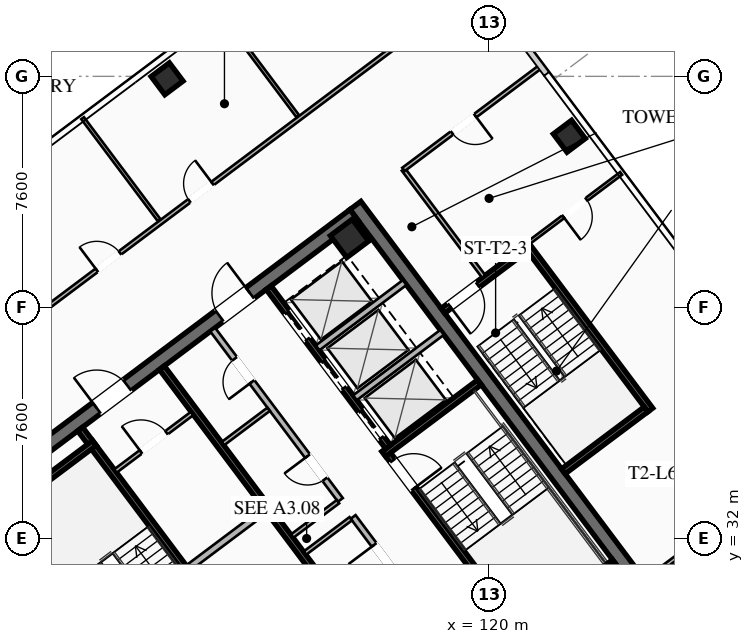
"""IFC4 building model, lengths in metres.
Left out: names, types, materials, properties, quantities, classifications, styles, units other than length and angle.
Written with IfcOpenShell. Run it as: python <this file> out.ifc"""

import sys

from ifc_helpers import new_model, si_unit, direction, frame, frame_2d, origin, origin_2d, place, context, subcontext, project, spatial, rectangle, hollow_rectangle, extrude, element, fill, save


model = new_model("IFC4")
c1 = context("Model", 3, precision=1e-05, world=origin(), true_north=direction((0.0, 1.0)))
c2 = subcontext(c1, "Body", "Model", "MODEL_VIEW")
j1 = project(units=[si_unit("LENGTHUNIT", "METRE"), si_unit("PLANEANGLEUNIT", "RADIAN")], contexts=[c1])
p1 = place(None, origin())
s1 = spatial("IfcSite", under=j1, at=p1, CompositionType="ELEMENT")
p2 = place(p1, origin())
s2 = spatial("IfcBuilding", under=s1, at=p2, CompositionType="ELEMENT")
p3 = place(p2, frame((0.0, 0.0, 221.95)))
s3 = spatial("IfcBuildingStorey", under=s2, at=p3, CompositionType="ELEMENT", Elevation=221.95)
for number, where, z_axis, x_axis in (
    (1, (112.396, 21.047, 0.0), (0.0, 0.0, 1.0), (-0.6, 0.8, 0.0)),
    (2, (115.604, 42.953, 0.0), (0.0, 0.0, 1.0), (0.6, -0.8, 0.0)),
):
    element("IfcWall", number, at=place(p3, frame(where, z_axis=z_axis, x_axis=x_axis)), inside=s3, PredefinedType="SHEAR", context=c2, shape_type="SweptSolid", body=[
        extrude(rectangle(XDim=15.6, YDim=0.45, at=frame_2d((7.8, 0.0))), origin(), (0.0, 0.0, 1.0), 3.55),
    ])
p4 = place(p3, frame((103.351, 33.482, 0.0), z_axis=(0.0, 0.0, 1.0), x_axis=(0.8, 0.6, 0.0)))
e3 = element("IfcWall", 3, at=p4, inside=s3, PredefinedType="SHEAR", context=c2, shape_type="SweptSolid", body=[
    extrude(rectangle(XDim=15.26, YDim=0.45, at=frame_2d((7.63, 0.0))), origin(), (0.0, 0.0, 1.0), 3.55),
])
p5 = place(p4, frame((4.68, 0.0, 0.0)))
e4 = element("IfcOpeningElement", 4, at=p5, cuts=e3, PredefinedType="OPENING", context=c2, shape_type="SweptSolid", body=[
    extrude(rectangle(XDim=1.25, YDim=2.25, at=frame_2d((0.625, 1.125))), frame((0.0, 0.235, 0.0), z_axis=(0.0, -1.0, 0.0), x_axis=(1.0, 0.0, 0.0)), (0.0, 0.0, 1.0), 0.47),
])
p6 = place(p4, frame((9.73, 0.0, 0.0)))
e5 = element("IfcOpeningElement", 5, at=p6, cuts=e3, PredefinedType="OPENING", context=c2, shape_type="SweptSolid", body=[
    extrude(rectangle(XDim=1.25, YDim=2.25, at=frame_2d((0.625, 1.125))), frame((0.0, 0.235, 0.0), z_axis=(0.0, -1.0, 0.0), x_axis=(1.0, 0.0, 0.0)), (0.0, 0.0, 1.0), 0.47),
])
for number, where, z_axis, x_axis in (
    (6, (123.87, 30.59, 0.0), (0.0, 0.0, 1.0), (0.8, 0.6, 0.0)),
    (7, (115.41, 41.87, 0.0), (0.0, 0.0, 1.0), (0.8, 0.6, 0.0)),
):
    element("IfcColumn", number, at=place(p3, frame(where, z_axis=z_axis, x_axis=x_axis)), inside=s3, PredefinedType="COLUMN", context=c2, shape_type="SweptSolid", body=[
        extrude(hollow_rectangle(XDim=0.9, YDim=0.9, WallThickness=0.04, at=origin_2d()), origin(), (0.0, 0.0, 1.0), 3.37),
    ])
for number, where, z_axis, x_axis in (
    (8, (122.64, 45.23, 0.0), (0.0, 0.0, 1.0), (0.8, 0.6, 0.0)),
    (9, (109.41, 47.12, 0.0), (0.0, 0.0, 1.0), (0.8, 0.6, 0.0)),
):
    element("IfcColumn", number, at=place(p3, frame(where, z_axis=z_axis, x_axis=x_axis)), inside=s3, PredefinedType="COLUMN", context=c2, shape_type="SweptSolid", body=[
        extrude(hollow_rectangle(XDim=0.75, YDim=0.75, WallThickness=0.032, at=origin_2d()), origin(), (0.0, 0.0, 1.0), 3.37),
    ])
p7 = place(p3, frame((111.44, 29.08, 0.0), z_axis=(0.0, 0.0, 1.0), x_axis=(-0.59999041401, 0.800007189403, 0.0)))
e10 = element("IfcWall", 10, at=p7, inside=s3, PredefinedType="SHEAR", context=c2, shape_type="SweptSolid", body=[
    extrude(rectangle(XDim=8.15, YDim=0.2, at=frame_2d((4.075, 0.0))), origin(), (0.0, 0.0, 1.0), 3.37),
])
p8 = place(p7, frame((0.45, 0.0, 0.0)))
e11 = element("IfcOpeningElement", 11, at=p8, cuts=e10, PredefinedType="OPENING", context=c2, shape_type="SweptSolid", body=[
    extrude(rectangle(XDim=1.15, YDim=2.2, at=frame_2d((0.575, 1.1))), frame((0.0, 0.11, 0.0), z_axis=(0.0, -1.0, 0.0), x_axis=(1.0, 0.0, 0.0)), (0.0, 0.0, 1.0), 0.22),
])
p9 = place(p3, frame((103.876, 32.782, 0.0), z_axis=(0.0, 0.0, 1.0), x_axis=(0.800014909178, 0.599980120581, 0.0)))
e12 = element("IfcWall", 12, at=p9, inside=s3, PredefinedType="SHEAR", context=c2, shape_type="SweptSolid", body=[
    extrude(rectangle(XDim=3.93, YDim=0.2, at=frame_2d((1.965, 0.0))), origin(), (0.0, 0.0, 1.0), 3.37),
])
p10 = place(p3, frame((116.56, 34.92, 0.0), z_axis=(0.0, 0.0, 1.0), x_axis=(0.59999041401, -0.800007189403, 0.0)))
e13 = element("IfcWall", 13, at=p10, inside=s3, PredefinedType="SHEAR", context=c2, shape_type="SweptSolid", body=[
    extrude(rectangle(XDim=8.15, YDim=0.2, at=frame_2d((4.075, 0.0))), origin(), (0.0, 0.0, 1.0), 3.37),
])
p11 = place(p10, frame((0.45, 0.0, 0.0)))
e14 = element("IfcOpeningElement", 14, at=p11, cuts=e13, PredefinedType="OPENING", context=c2, shape_type="SweptSolid", body=[
    extrude(rectangle(XDim=1.15, YDim=2.2, at=frame_2d((0.575, 1.1))), frame((0.0, 0.11, 0.0), z_axis=(0.0, -1.0, 0.0), x_axis=(1.0, 0.0, 0.0)), (0.0, 0.0, 1.0), 0.22),
])
for number, where, z_axis, x_axis in (
    (15, (116.54, 34.78, 0.0), (0.0, 0.0, 1.0), (0.8, 0.6, 0.0)),
    (16, (120.98, 28.86, 0.0), (0.0, 0.0, 1.0), (0.8, 0.6, 0.0)),
):
    element("IfcWall", number, at=place(p3, frame(where, z_axis=z_axis, x_axis=x_axis)), inside=s3, PredefinedType="SHEAR", context=c2, shape_type="SweptSolid", body=[
        extrude(rectangle(XDim=3.93, YDim=0.2, at=frame_2d((1.965, 0.0))), origin(), (0.0, 0.0, 1.0), 3.37),
    ])
p12 = place(p3, frame((118.058, 25.856, 0.0), z_axis=(0.0, 0.0, 1.0), x_axis=(-0.600002657301, 0.799998007018, 0.0)))
e17 = element("IfcWall", 17, at=p12, inside=s3, PredefinedType="SHEAR", context=c2, shape_type="SweptSolid", body=[
    extrude(rectangle(XDim=14.7, YDim=0.2, at=frame_2d((7.35, 0.0))), origin(), (0.0, 0.0, 1.0), 3.37),
])
p13 = place(p3, frame((110.104, 31.028, 0.0), z_axis=(0.0, 0.0, 1.0), x_axis=(0.800018601094, 0.59997519774, 0.0)))
e18 = element("IfcWall", 18, at=p13, inside=s3, PredefinedType="SOLIDWALL", context=c2, shape_type="SweptSolid", body=[
    extrude(rectangle(XDim=3.15, YDim=0.22, at=frame_2d((1.575, 0.0))), origin(), (0.0, 0.0, 1.0), 2.723),
])
p14 = place(p3, frame((112.75, 40.25, 0.0), z_axis=(0.0, 0.0, 1.0), x_axis=(0.599994036198, -0.800004472816, 0.0)))
e19 = element("IfcWall", 19, at=p14, inside=s3, PredefinedType="SHEAR", context=c2, shape_type="SweptSolid", body=[
    extrude(rectangle(XDim=6.55, YDim=0.2, at=frame_2d((3.275, 0.0))), origin(), (0.0, 0.0, 1.0), 3.37),
])
p15 = place(p14, frame((5.075, 0.0, 0.0)))
e20 = element("IfcOpeningElement", 20, at=p15, cuts=e19, PredefinedType="OPENING", context=c2, shape_type="SweptSolid", body=[
    extrude(rectangle(XDim=1.1, YDim=2.2, at=frame_2d((0.55, 1.1))), frame((0.0, 0.11, 0.0), z_axis=(0.0, -1.0, 0.0), x_axis=(1.0, 0.0, 0.0)), (0.0, 0.0, 1.0), 0.22),
])
p16 = place(p14, frame((3.025, 0.0, 0.0)))
e21 = element("IfcOpeningElement", 21, at=p16, cuts=e19, PredefinedType="OPENING", context=c2, shape_type="SweptSolid", body=[
    extrude(rectangle(XDim=1.1, YDim=2.2, at=frame_2d((0.55, 1.1))), frame((0.0, 0.11, 0.0), z_axis=(0.0, -1.0, 0.0), x_axis=(1.0, 0.0, 0.0)), (0.0, 0.0, 1.0), 0.22),
])
p17 = place(p14, frame((1.025, 0.0, 0.0)))
e22 = element("IfcOpeningElement", 22, at=p17, cuts=e19, PredefinedType="OPENING", context=c2, shape_type="SweptSolid", body=[
    extrude(rectangle(XDim=1.1, YDim=2.2, at=frame_2d((0.55, 1.1))), frame((0.0, 0.11, 0.0), z_axis=(0.0, -1.0, 0.0), x_axis=(1.0, 0.0, 0.0)), (0.0, 0.0, 1.0), 0.22),
])
for number, where, z_axis, x_axis in (
    (23, (115.59, 36.63, 0.0), (0.0, 0.0, 1.0), (0.8, 0.6, 0.0)),
    (24, (114.36, 38.27, 0.0), (0.0, 0.0, 1.0), (0.8, 0.6, 0.0)),
):
    element("IfcWall", number, at=place(p3, frame(where, z_axis=z_axis, x_axis=x_axis)), inside=s3, PredefinedType="SOLIDWALL", context=c2, shape_type="SweptSolid", body=[
        extrude(rectangle(XDim=3.58, YDim=0.2, at=frame_2d((1.79, 0.0))), origin(), (0.0, 0.0, 1.0), 3.37),
    ])
p18 = place(p3, frame((107.71, 34.22, 0.0), z_axis=(0.0, 0.0, 1.0), x_axis=(0.799981399002, 0.60002480053, 0.0)))
e25 = element("IfcWall", 25, at=p18, inside=s3, PredefinedType="PARTITIONING", context=c2, shape_type="SweptSolid", body=[
    extrude(rectangle(XDim=3.15, YDim=0.135, at=frame_2d((1.575, 0.0))), origin(), (0.0, 0.0, 1.0), 2.723),
])
p19 = place(p18, frame((1.05, 0.0, 0.0)))
e26 = element("IfcOpeningElement", 26, at=p19, cuts=e25, PredefinedType="OPENING", context=c2, shape_type="SweptSolid", body=[
    extrude(rectangle(XDim=1.05, YDim=2.2, at=frame_2d((0.525, 1.1))), frame((0.0, 0.077, 0.0), z_axis=(0.0, -1.0, 0.0), x_axis=(1.0, 0.0, 0.0)), (0.0, 0.0, 1.0), 0.155),
])
p20 = place(p3, frame((119.73, 27.11, 0.0), z_axis=(0.0, 0.0, 1.0), x_axis=(-0.600005580459, 0.799995814625, 0.0)))
e27 = element("IfcWall", 27, at=p20, inside=s3, PredefinedType="SOLIDWALL", context=c2, shape_type="SweptSolid", body=[
    extrude(rectangle(XDim=7.0, YDim=0.2, at=frame_2d((3.5, 0.0))), origin(), (0.0, 0.0, 1.0), 2.723),
])
p21 = place(p20, frame((0.85, 0.0, 0.0)))
e28 = element("IfcOpeningElement", 28, at=p21, cuts=e27, PredefinedType="OPENING", context=c2, shape_type="SweptSolid", body=[
    extrude(rectangle(XDim=0.95, YDim=2.05, at=frame_2d((0.475, 1.025))), frame((0.0, 0.11, 0.0), z_axis=(0.0, -1.0, 0.0), x_axis=(1.0, 0.0, 0.0)), (0.0, 0.0, 1.0), 0.22),
])
p22 = place(p20, frame((4.8, 0.0, 0.0)))
e29 = element("IfcOpeningElement", 29, at=p22, cuts=e27, PredefinedType="OPENING", context=c2, shape_type="SweptSolid", body=[
    extrude(rectangle(XDim=1.05, YDim=2.2, at=frame_2d((0.525, 1.1))), frame((0.0, 0.11, 0.0), z_axis=(0.0, -1.0, 0.0), x_axis=(1.0, 0.0, 0.0)), (0.0, 0.0, 1.0), 0.22),
])
p23 = place(p3, frame((113.946, 31.522, 0.0), z_axis=(0.0, 0.0, 1.0), x_axis=(0.8, 0.6, 0.0)))
e30 = element("IfcWall", 30, at=p23, inside=s3, PredefinedType="PARTITIONING", context=c2, shape_type="SweptSolid", body=[
    extrude(rectangle(XDim=1.88, YDim=0.135, at=frame_2d((0.94, 0.0))), origin(), (0.0, 0.0, 1.0), 2.723),
])
p24 = place(p3, frame((115.11, 33.27, 0.0), z_axis=(0.0, 0.0, 1.0), x_axis=(-0.600011160345, 0.79999162962, 0.0)))
e31 = element("IfcWall", 31, at=p24, inside=s3, PredefinedType="SOLIDWALL", context=c2, shape_type="SweptSolid", body=[
    extrude(rectangle(XDim=7.0, YDim=0.2, at=frame_2d((3.5, 0.0))), origin(), (0.0, 0.0, 1.0), 2.723),
])
p25 = place(p24, frame((0.85, 0.0, 0.0)))
e32 = element("IfcOpeningElement", 32, at=p25, cuts=e31, PredefinedType="OPENING", context=c2, shape_type="SweptSolid", body=[
    extrude(rectangle(XDim=0.95, YDim=2.05, at=frame_2d((0.475, 1.025))), frame((0.0, 0.11, 0.0), z_axis=(0.0, -1.0, 0.0), x_axis=(1.0, 0.0, 0.0)), (0.0, 0.0, 1.0), 0.22),
])
p26 = place(p24, frame((4.85, 0.0, 0.0)))
e33 = element("IfcOpeningElement", 33, at=p26, cuts=e31, PredefinedType="OPENING", context=c2, shape_type="SweptSolid", body=[
    extrude(rectangle(XDim=0.95, YDim=2.05, at=frame_2d((0.475, 1.025))), frame((0.0, 0.11, 0.0), z_axis=(0.0, -1.0, 0.0), x_axis=(1.0, 0.0, 0.0)), (0.0, 0.0, 1.0), 0.22),
])
p27 = place(p3, frame((113.526, 32.082, 0.0), z_axis=(0.0, 0.0, 1.0), x_axis=(0.800046745961, 0.599937666993, 0.0)))
e34 = element("IfcWall", 34, at=p27, inside=s3, PredefinedType="PARTITIONING", context=c2, shape_type="SweptSolid", body=[
    extrude(rectangle(XDim=1.88, YDim=0.135, at=frame_2d((0.94, 0.0))), origin(), (0.0, 0.0, 1.0), 2.723),
])
p28 = place(p3, frame((111.246, 35.122, 0.0), z_axis=(0.0, 0.0, 1.0), x_axis=(0.8, 0.6, 0.0)))
e35 = element("IfcWall", 35, at=p28, inside=s3, PredefinedType="PARTITIONING", context=c2, shape_type="SweptSolid", body=[
    extrude(rectangle(XDim=1.88, YDim=0.135, at=frame_2d((0.94, 0.0))), origin(), (0.0, 0.0, 1.0), 2.723),
])
p29 = place(p3, frame((125.304, 36.228, 0.0), z_axis=(0.0, 0.0, 1.0), x_axis=(-0.59998851072, 0.800008616831, 0.0)))
e36 = element("IfcWall", 36, at=p29, inside=s3, PredefinedType="SHEAR", context=c2, shape_type="SweptSolid", body=[
    extrude(rectangle(XDim=6.8, YDim=0.2, at=frame_2d((3.4, 0.0))), origin(), (0.0, 0.0, 1.0), 3.37),
])
p30 = place(p3, frame((121.204, 41.528, 0.0), z_axis=(0.0, 0.0, 1.0), x_axis=(-0.800017232136, -0.599977023131, 0.0)))
e37 = element("IfcWall", 37, at=p30, inside=s3, PredefinedType="SHEAR", context=c2, shape_type="SweptSolid", body=[
    extrude(rectangle(XDim=3.4, YDim=0.2, at=frame_2d((1.7, 0.0))), origin(), (0.0, 0.0, 1.0), 3.37),
])
p31 = place(p30, frame((1.975, 0.0, 0.0)))
e38 = element("IfcOpeningElement", 38, at=p31, cuts=e37, PredefinedType="OPENING", context=c2, shape_type="SweptSolid", body=[
    extrude(rectangle(XDim=1.15, YDim=2.2, at=frame_2d((0.575, 1.1))), frame((0.0, 0.11, 0.0), z_axis=(0.0, -1.0, 0.0), x_axis=(1.0, 0.0, 0.0)), (0.0, 0.0, 1.0), 0.22),
])
p32 = place(p3, frame((122.444, 34.208, 0.0), z_axis=(0.0, 0.0, 1.0), x_axis=(0.79999138319, 0.600011488909, 0.0)))
e39 = element("IfcWall", 39, at=p32, inside=s3, PredefinedType="SHEAR", context=c2, shape_type="SweptSolid", body=[
    extrude(rectangle(XDim=3.4, YDim=0.2, at=frame_2d((1.7, 0.0))), origin(), (0.0, 0.0, 1.0), 3.37),
])
p33 = place(p3, frame((119.824, 40.618, 0.0), z_axis=(0.0, 0.0, 1.0), x_axis=(-0.599982243973, 0.800013316712, 0.0)))
e40 = element("IfcWall", 40, at=p33, inside=s3, PredefinedType="PARTITIONING", context=c2, shape_type="SweptSolid", body=[
    extrude(rectangle(XDim=4.4, YDim=0.135, at=frame_2d((2.2, 0.0))), origin(), (0.0, 0.0, 1.0), 2.723),
])
p34 = place(p3, frame((98.696, 34.522, 0.0), z_axis=(0.0, 0.0, 1.0), x_axis=(0.799998778269, 0.600001628972, 0.0)))
e41 = element("IfcWall", 41, at=p34, inside=s3, PredefinedType="PARTITIONING", context=c2, shape_type="SweptSolid", body=[
    extrude(rectangle(XDim=23.98, YDim=0.135, at=frame_2d((11.99, 0.0))), origin(), (0.0, 0.0, 1.0), 2.723),
])
p35 = place(p34, frame((0.3, 0.0, 0.0)))
e42 = element("IfcOpeningElement", 42, at=p35, cuts=e41, PredefinedType="OPENING", context=c2, shape_type="SweptSolid", body=[
    extrude(rectangle(XDim=0.95, YDim=2.05, at=frame_2d((0.475, 1.025))), frame((0.0, 0.077, 0.0), z_axis=(0.0, -1.0, 0.0), x_axis=(1.0, 0.0, 0.0)), (0.0, 0.0, 1.0), 0.155),
])
p36 = place(p34, frame((10.503, 0.0, 0.0)))
e43 = element("IfcOpeningElement", 43, at=p36, cuts=e41, PredefinedType="OPENING", context=c2, shape_type="SweptSolid", body=[
    extrude(rectangle(XDim=0.95, YDim=2.05, at=frame_2d((0.475, 1.025))), frame((0.0, 0.077, 0.0), z_axis=(0.0, -1.0, 0.0), x_axis=(1.0, 0.0, 0.0)), (0.0, 0.0, 1.0), 0.155),
])
p37 = place(p34, frame((14.308, 0.0, 0.0)))
e44 = element("IfcOpeningElement", 44, at=p37, cuts=e41, PredefinedType="OPENING", context=c2, shape_type="SweptSolid", body=[
    extrude(rectangle(XDim=0.95, YDim=2.05, at=frame_2d((0.475, 1.025))), frame((0.0, 0.077, 0.0), z_axis=(0.0, -1.0, 0.0), x_axis=(1.0, 0.0, 0.0)), (0.0, 0.0, 1.0), 0.155),
])
p38 = place(p34, frame((22.73, 0.0, 0.0)))
e45 = element("IfcOpeningElement", 45, at=p38, cuts=e41, PredefinedType="OPENING", context=c2, shape_type="SweptSolid", body=[
    extrude(rectangle(XDim=0.95, YDim=2.05, at=frame_2d((0.475, 1.025))), frame((0.0, 0.077, 0.0), z_axis=(0.0, -1.0, 0.0), x_axis=(1.0, 0.0, 0.0)), (0.0, 0.0, 1.0), 0.155),
])
for number, where, z_axis, x_axis in (
    (46, (109.152, 42.464, 0.0), (0.0, 0.0, 1.0), (-0.6, 0.8, 0.0)),
    (47, (113.712, 45.884, 0.0), (0.0, 0.0, 1.0), (-0.6, 0.8, 0.0)),
):
    element("IfcWall", number, at=place(p3, frame(where, z_axis=z_axis, x_axis=x_axis)), inside=s3, PredefinedType="PARTITIONING", context=c2, shape_type="SweptSolid", body=[
        extrude(rectangle(XDim=4.2, YDim=0.11, at=frame_2d((2.1, 0.0))), origin(), (0.0, 0.0, 1.0), 2.723),
    ])
p39 = place(p3, frame((121.704, 47.528, 0.0), z_axis=(0.0, 0.0, 1.0), x_axis=(-0.799989629485, -0.600013827105, 0.0)))
e48 = element("IfcWall", 48, at=p39, inside=s3, PredefinedType="PARTITIONING", context=c2, shape_type="SweptSolid", body=[
    extrude(rectangle(XDim=5.65, YDim=0.135, at=frame_2d((2.825, 0.0))), origin(), (0.0, 0.0, 1.0), 2.723),
])
p40 = place(p39, frame((2.7, 0.0, 0.0)))
e49 = element("IfcOpeningElement", 49, at=p40, cuts=e48, PredefinedType="OPENING", context=c2, shape_type="SweptSolid", body=[
    extrude(rectangle(XDim=0.95, YDim=2.05, at=frame_2d((0.475, 1.025))), frame((0.0, 0.077, 0.0), z_axis=(0.0, -1.0, 0.0), x_axis=(1.0, 0.0, 0.0)), (0.0, 0.0, 1.0), 0.155),
])
p41 = place(p3, frame((125.208, 30.656, 0.0), z_axis=(0.0, 0.0, 1.0), x_axis=(0.79999199534, 0.600010672732, 0.0)))
e50 = element("IfcWall", 50, at=p41, inside=s3, PredefinedType="PARTITIONING", context=c2, shape_type="SweptSolid", body=[
    extrude(rectangle(XDim=7.32, YDim=0.135, at=frame_2d((3.66, 0.0))), origin(), (0.0, 0.0, 1.0), 2.723),
])
p42 = place(p3, frame((124.344, 44.008, 0.0), z_axis=(0.0, 0.0, 1.0), x_axis=(-0.8, -0.6, 0.0)))
e51 = element("IfcWall", 51, at=p42, inside=s3, PredefinedType="PARTITIONING", context=c2, shape_type="SweptSolid", body=[
    extrude(rectangle(XDim=3.8, YDim=0.11, at=frame_2d((1.9, 0.0))), origin(), (0.0, 0.0, 1.0), 2.723),
])
p43 = place(p42, frame((1.425, 0.0, 0.0)))
e52 = element("IfcOpeningElement", 52, at=p43, cuts=e51, PredefinedType="OPENING", context=c2, shape_type="SweptSolid", body=[
    extrude(rectangle(XDim=0.95, YDim=2.05, at=frame_2d((0.475, 1.025))), frame((0.0, 0.065, 0.0), z_axis=(0.0, -1.0, 0.0), x_axis=(1.0, 0.0, 0.0)), (0.0, 0.0, 1.0), 0.13),
])
p44 = place(p3, frame((111.17, 17.89, 0.0), z_axis=(0.0, 0.0, 1.0), x_axis=(-0.599998113842, 0.800001414615, 0.0)))
e53 = element("IfcWall", 53, at=p44, inside=s3, PredefinedType="PARTITIONING", context=c2, shape_type="SweptSolid", body=[
    extrude(rectangle(XDim=20.71, YDim=0.135, at=frame_2d((10.355, 0.0))), origin(), (0.0, 0.0, 1.0), 2.723),
])
p45 = place(p44, frame((19.46, 0.0, 0.0)))
e54 = element("IfcOpeningElement", 54, at=p45, cuts=e53, PredefinedType="OPENING", context=c2, shape_type="SweptSolid", body=[
    extrude(rectangle(XDim=0.95, YDim=2.05, at=frame_2d((0.475, 1.025))), frame((0.0, 0.077, 0.0), z_axis=(0.0, -1.0, 0.0), x_axis=(1.0, 0.0, 0.0)), (0.0, 0.0, 1.0), 0.155),
])
p46 = place(p5, origin())
e55 = element("IfcDoor", 55, at=p46, inside=s3, OperationType="SINGLE_SWING_LEFT", PredefinedType="DOOR", context=c2, shape_type="SweptSolid", body=[
    extrude(rectangle(XDim=1.25, YDim=2.25, at=frame_2d((0.625, 1.125))), frame((0.0, 0.025, 0.0), z_axis=(0.0, -1.0, 0.0), x_axis=(1.0, 0.0, 0.0)), (0.0, 0.0, 1.0), 0.05),
])
fill(e4, e55)
p47 = place(p6, origin())
e56 = element("IfcDoor", 56, at=p47, inside=s3, OperationType="SINGLE_SWING_RIGHT", PredefinedType="DOOR", context=c2, shape_type="SweptSolid", body=[
    extrude(rectangle(XDim=1.25, YDim=2.25, at=frame_2d((0.625, 1.125))), frame((0.0, 0.025, 0.0), z_axis=(0.0, -1.0, 0.0), x_axis=(1.0, 0.0, 0.0)), (0.0, 0.0, 1.0), 0.05),
])
fill(e5, e56)
p48 = place(p11, origin())
e57 = element("IfcDoor", 57, at=p48, inside=s3, OperationType="SINGLE_SWING_RIGHT", PredefinedType="DOOR", context=c2, shape_type="SweptSolid", body=[
    extrude(rectangle(XDim=1.15, YDim=2.2, at=frame_2d((0.575, 1.1))), frame((0.0, 0.025, 0.0), z_axis=(0.0, -1.0, 0.0), x_axis=(1.0, 0.0, 0.0)), (0.0, 0.0, 1.0), 0.05),
])
fill(e14, e57)
p49 = place(p19, origin())
e58 = element("IfcDoor", 58, at=p49, inside=s3, OperationType="SINGLE_SWING_LEFT", PredefinedType="DOOR", context=c2, shape_type="SweptSolid", body=[
    extrude(rectangle(XDim=1.05, YDim=2.2, at=frame_2d((0.525, 1.1))), frame((0.0, 0.025, 0.0), z_axis=(0.0, -1.0, 0.0), x_axis=(1.0, 0.0, 0.0)), (0.0, 0.0, 1.0), 0.05),
])
fill(e26, e58)
p50 = place(p22, origin())
e59 = element("IfcDoor", 59, at=p50, inside=s3, OperationType="SINGLE_SWING_RIGHT", PredefinedType="DOOR", context=c2, shape_type="SweptSolid", body=[
    extrude(rectangle(XDim=1.05, YDim=2.2, at=frame_2d((0.525, 1.1))), frame((0.0, 0.025, 0.0), z_axis=(0.0, -1.0, 0.0), x_axis=(1.0, 0.0, 0.0)), (0.0, 0.0, 1.0), 0.05),
])
fill(e29, e59)
p51 = place(p25, origin())
e60 = element("IfcDoor", 60, at=p51, inside=s3, OperationType="SINGLE_SWING_RIGHT", PredefinedType="DOOR", context=c2, shape_type="SweptSolid", body=[
    extrude(rectangle(XDim=0.95, YDim=2.05, at=frame_2d((0.475, 1.025))), frame((0.0, 0.025, 0.0), z_axis=(0.0, -1.0, 0.0), x_axis=(1.0, 0.0, 0.0)), (0.0, 0.0, 1.0), 0.05),
])
fill(e32, e60)
p52 = place(p26, origin())
e61 = element("IfcDoor", 61, at=p52, inside=s3, OperationType="SINGLE_SWING_LEFT", PredefinedType="DOOR", context=c2, shape_type="SweptSolid", body=[
    extrude(rectangle(XDim=0.95, YDim=2.05, at=frame_2d((0.475, 1.025))), frame((0.0, 0.025, 0.0), z_axis=(0.0, -1.0, 0.0), x_axis=(1.0, 0.0, 0.0)), (0.0, 0.0, 1.0), 0.05),
])
fill(e33, e61)
p53 = place(p31, origin())
e62 = element("IfcDoor", 62, at=p53, inside=s3, OperationType="SINGLE_SWING_RIGHT", PredefinedType="DOOR", context=c2, shape_type="SweptSolid", body=[
    extrude(rectangle(XDim=1.15, YDim=2.2, at=frame_2d((0.575, 1.1))), frame((0.0, 0.025, 0.0), z_axis=(0.0, -1.0, 0.0), x_axis=(1.0, 0.0, 0.0)), (0.0, 0.0, 1.0), 0.05),
])
fill(e38, e62)
p54 = place(p36, origin())
e63 = element("IfcDoor", 63, at=p54, inside=s3, OperationType="SINGLE_SWING_LEFT", PredefinedType="DOOR", context=c2, shape_type="SweptSolid", body=[
    extrude(rectangle(XDim=0.95, YDim=2.05, at=frame_2d((0.475, 1.025))), frame((0.0, 0.025, 0.0), z_axis=(0.0, -1.0, 0.0), x_axis=(1.0, 0.0, 0.0)), (0.0, 0.0, 1.0), 0.05),
])
fill(e43, e63)
p55 = place(p37, origin())
e64 = element("IfcDoor", 64, at=p55, inside=s3, OperationType="SINGLE_SWING_RIGHT", PredefinedType="DOOR", context=c2, shape_type="SweptSolid", body=[
    extrude(rectangle(XDim=0.95, YDim=2.05, at=frame_2d((0.475, 1.025))), frame((0.0, 0.025, 0.0), z_axis=(0.0, -1.0, 0.0), x_axis=(1.0, 0.0, 0.0)), (0.0, 0.0, 1.0), 0.05),
])
fill(e44, e64)
p56 = place(p40, origin())
e65 = element("IfcDoor", 65, at=p56, inside=s3, OperationType="SINGLE_SWING_LEFT", PredefinedType="DOOR", context=c2, shape_type="SweptSolid", body=[
    extrude(rectangle(XDim=0.95, YDim=2.05, at=frame_2d((0.475, 1.025))), frame((0.0, 0.025, 0.0), z_axis=(0.0, -1.0, 0.0), x_axis=(1.0, 0.0, 0.0)), (0.0, 0.0, 1.0), 0.05),
])
fill(e49, e65)
p57 = place(p43, origin())
e66 = element("IfcDoor", 66, at=p57, inside=s3, OperationType="SINGLE_SWING_RIGHT", PredefinedType="DOOR", context=c2, shape_type="SweptSolid", body=[
    extrude(rectangle(XDim=0.95, YDim=2.05, at=frame_2d((0.475, 1.025))), frame((0.0, 0.025, 0.0), z_axis=(0.0, -1.0, 0.0), x_axis=(1.0, 0.0, 0.0)), (0.0, 0.0, 1.0), 0.05),
])
fill(e52, e66)
p58 = place(p15, origin())
e67 = element("IfcDoor", 67, at=p58, inside=s3, OperationType="SLIDING_TO_LEFT", PredefinedType="DOOR", context=c2, shape_type="SweptSolid", body=[
    extrude(rectangle(XDim=1.1, YDim=2.2, at=frame_2d((0.55, 1.1))), frame((0.0, 0.025, 0.0), z_axis=(0.0, -1.0, 0.0), x_axis=(1.0, 0.0, 0.0)), (0.0, 0.0, 1.0), 0.05),
])
fill(e20, e67)
p59 = place(p16, origin())
e68 = element("IfcDoor", 68, at=p59, inside=s3, OperationType="SLIDING_TO_LEFT", PredefinedType="DOOR", context=c2, shape_type="SweptSolid", body=[
    extrude(rectangle(XDim=1.1, YDim=2.2, at=frame_2d((0.55, 1.1))), frame((0.0, 0.025, 0.0), z_axis=(0.0, -1.0, 0.0), x_axis=(1.0, 0.0, 0.0)), (0.0, 0.0, 1.0), 0.05),
])
fill(e21, e68)
p60 = place(p17, origin())
e69 = element("IfcDoor", 69, at=p60, inside=s3, OperationType="SLIDING_TO_LEFT", PredefinedType="DOOR", context=c2, shape_type="SweptSolid", body=[
    extrude(rectangle(XDim=1.1, YDim=2.2, at=frame_2d((0.55, 1.1))), frame((0.0, 0.025, 0.0), z_axis=(0.0, -1.0, 0.0), x_axis=(1.0, 0.0, 0.0)), (0.0, 0.0, 1.0), 0.05),
])
fill(e22, e69)
save(model, sys.argv[1])
